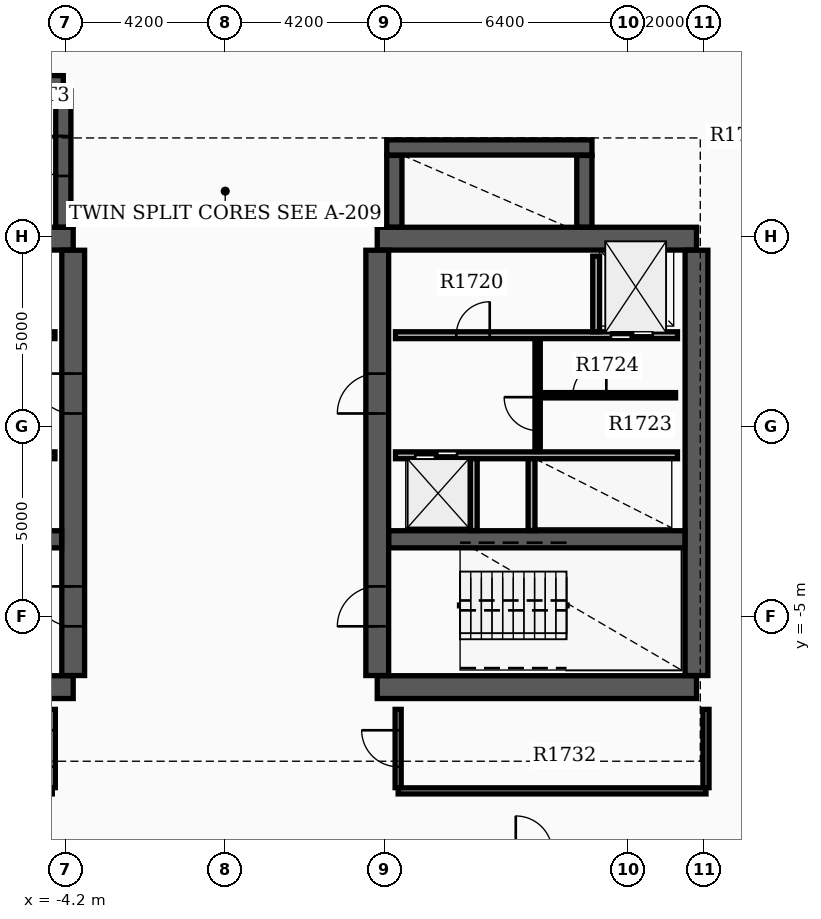
"""IFC4 building model, lengths in metres.
Left out: names, types, materials, properties, quantities, classifications, styles, units other than length and angle.
Written with IfcOpenShell. Run it as: python <this file> out.ifc"""

import sys

from ifc_helpers import new_model, si_unit, direction, frame, frame_2d, origin, place, context, subcontext, project, spatial, rectangle, extrude, element, fill, save


model = new_model("IFC4")
c1 = context("Model", 3, precision=1e-05, world=origin(), true_north=direction((0.0, 1.0)))
c2 = subcontext(c1, "Body", "Model", "MODEL_VIEW")
j1 = project(units=[si_unit("LENGTHUNIT", "METRE"), si_unit("PLANEANGLEUNIT", "RADIAN")], contexts=[c1])
p1 = place(None, origin())
s1 = spatial("IfcSite", under=j1, at=p1, CompositionType="ELEMENT")
p2 = place(p1, origin())
s2 = spatial("IfcBuilding", under=s1, at=p2, CompositionType="ELEMENT")
p3 = place(p2, frame((0.0, 0.0, 112.5)))
s3 = spatial("IfcBuildingStorey", under=s2, at=p3, CompositionType="ELEMENT", Elevation=112.5)
for number, where, z_axis, x_axis in (
    (1, (-12.4, -6.85, 0.0), (0.0, 0.0, 1.0), (1.0, 0.0, 0.0)),
    (2, (-12.4, 4.95, 0.0), (0.0, 0.0, 1.0), (1.0, 0.0, 0.0)),
):
    element("IfcWall", number, at=place(p3, frame(where, z_axis=z_axis, x_axis=x_axis)), inside=s3, PredefinedType="SHEAR", context=c2, shape_type="SweptSolid", body=[
        extrude(rectangle(XDim=8.4, YDim=0.6, at=frame_2d((4.2, 0.0))), origin(), (0.0, 0.0, 1.0), 3.7),
    ])
p4 = place(p3, frame((-4.0, -6.545, 0.0), z_axis=(0.0, 0.0, 1.0), x_axis=(0.0, 1.0, 0.0)))
e3 = element("IfcWall", 3, at=p4, inside=s3, PredefinedType="SHEAR", context=c2, shape_type="SweptSolid", body=[
    extrude(rectangle(XDim=11.19, YDim=0.6, at=frame_2d((5.595, 0.0))), origin(), (0.0, 0.0, 1.0), 3.7),
])
p5 = place(p4, frame((1.295, 0.0, 0.0)))
e4 = element("IfcOpeningElement", 4, at=p5, cuts=e3, PredefinedType="OPENING", context=c2, shape_type="SweptSolid", body=[
    extrude(rectangle(XDim=1.05, YDim=2.15, at=frame_2d((0.525, 1.075))), frame((0.0, 0.31, 0.0), z_axis=(0.0, -1.0, 0.0), x_axis=(1.0, 0.0, 0.0)), (0.0, 0.0, 1.0), 0.62),
])
p6 = place(p4, frame((6.895, 0.0, 0.0)))
e5 = element("IfcOpeningElement", 5, at=p6, cuts=e3, PredefinedType="OPENING", context=c2, shape_type="SweptSolid", body=[
    extrude(rectangle(XDim=1.05, YDim=2.15, at=frame_2d((0.525, 1.075))), frame((0.0, 0.31, 0.0), z_axis=(0.0, -1.0, 0.0), x_axis=(1.0, 0.0, 0.0)), (0.0, 0.0, 1.0), 0.62),
])
p7 = place(p3, frame((-12.095, -2.96, 0.0), z_axis=(0.0, 0.0, 1.0), x_axis=(1.0, 0.0, 0.0)))
e6 = element("IfcWall", 6, at=p7, inside=s3, PredefinedType="SHEAR", context=c2, shape_type="SweptSolid", body=[
    extrude(rectangle(XDim=7.79, YDim=0.45, at=frame_2d((3.895, 0.0))), origin(), (0.0, 0.0, 1.0), 3.7),
])
for number, where, z_axis, x_axis in (
    (7, (4.0, -6.85, 0.0), (0.0, 0.0, 1.0), (1.0, 0.0, 0.0)),
    (8, (4.0, 4.95, 0.0), (0.0, 0.0, 1.0), (1.0, 0.0, 0.0)),
):
    element("IfcWall", number, at=place(p3, frame(where, z_axis=z_axis, x_axis=x_axis)), inside=s3, PredefinedType="SHEAR", context=c2, shape_type="SweptSolid", body=[
        extrude(rectangle(XDim=8.4, YDim=0.6, at=frame_2d((4.2, 0.0))), origin(), (0.0, 0.0, 1.0), 3.7),
    ])
p8 = place(p3, frame((4.0, -6.545, 0.0), z_axis=(0.0, 0.0, 1.0), x_axis=(0.0, 1.0, 0.0)))
e9 = element("IfcWall", 9, at=p8, inside=s3, PredefinedType="SHEAR", context=c2, shape_type="SweptSolid", body=[
    extrude(rectangle(XDim=11.19, YDim=0.6, at=frame_2d((5.595, 0.0))), origin(), (0.0, 0.0, 1.0), 3.7),
])
p9 = place(p8, frame((1.295, 0.0, 0.0)))
e10 = element("IfcOpeningElement", 10, at=p9, cuts=e9, PredefinedType="OPENING", context=c2, shape_type="SweptSolid", body=[
    extrude(rectangle(XDim=1.05, YDim=2.15, at=frame_2d((0.525, 1.075))), frame((0.0, 0.31, 0.0), z_axis=(0.0, -1.0, 0.0), x_axis=(1.0, 0.0, 0.0)), (0.0, 0.0, 1.0), 0.62),
])
p10 = place(p8, frame((6.895, 0.0, 0.0)))
e11 = element("IfcOpeningElement", 11, at=p10, cuts=e9, PredefinedType="OPENING", context=c2, shape_type="SweptSolid", body=[
    extrude(rectangle(XDim=1.05, YDim=2.15, at=frame_2d((0.525, 1.075))), frame((0.0, 0.31, 0.0), z_axis=(0.0, -1.0, 0.0), x_axis=(1.0, 0.0, 0.0)), (0.0, 0.0, 1.0), 0.62),
])
p11 = place(p3, frame((12.4, -6.545, 0.0), z_axis=(0.0, 0.0, 1.0), x_axis=(0.0, 1.0, 0.0)))
e12 = element("IfcWall", 12, at=p11, inside=s3, PredefinedType="SHEAR", context=c2, shape_type="SweptSolid", body=[
    extrude(rectangle(XDim=11.19, YDim=0.6, at=frame_2d((5.595, 0.0))), origin(), (0.0, 0.0, 1.0), 3.7),
])
p12 = place(p3, frame((4.305, -2.96, 0.0), z_axis=(0.0, 0.0, 1.0), x_axis=(1.0, 0.0, 0.0)))
e13 = element("IfcWall", 13, at=p12, inside=s3, PredefinedType="SHEAR", context=c2, shape_type="SweptSolid", body=[
    extrude(rectangle(XDim=7.79, YDim=0.45, at=frame_2d((3.895, 0.0))), origin(), (0.0, 0.0, 1.0), 3.7),
])
p13 = place(p3, frame((-12.22, 9.04, 0.0), z_axis=(0.0, 0.0, 1.0), x_axis=(1.0, 0.0, 0.0)))
e14 = element("IfcWall", 14, at=p13, inside=s3, PredefinedType="SHEAR", context=c2, shape_type="SweptSolid", body=[
    extrude(rectangle(XDim=7.96, YDim=0.4, at=frame_2d((3.98, 0.0))), origin(), (0.0, 0.0, 1.0), 3.7),
])
p14 = place(p3, frame((-4.26, 5.255, 0.0), z_axis=(0.0, 0.0, 1.0), x_axis=(0.0, 1.0, 0.0)))
e15 = element("IfcWall", 15, at=p14, inside=s3, PredefinedType="SHEAR", context=c2, shape_type="SweptSolid", body=[
    extrude(rectangle(XDim=3.58, YDim=0.4, at=frame_2d((1.79, 0.0))), origin(), (0.0, 0.0, 1.0), 3.7),
])
p15 = place(p14, frame((1.345, 0.0, 0.0)))
e16 = element("IfcOpeningElement", 16, at=p15, cuts=e15, PredefinedType="OPENING", context=c2, shape_type="SweptSolid", body=[
    extrude(rectangle(XDim=1.05, YDim=2.15, at=frame_2d((0.525, 1.075))), frame((0.0, 0.21, 0.0), z_axis=(0.0, -1.0, 0.0), x_axis=(1.0, 0.0, 0.0)), (0.0, 0.0, 1.0), 0.42),
])
p16 = place(p3, frame((4.45, 5.255, 0.0), z_axis=(0.0, 0.0, 1.0), x_axis=(0.0, 1.0, 0.0)))
e17 = element("IfcWall", 17, at=p16, inside=s3, PredefinedType="SHEAR", context=c2, shape_type="SweptSolid", body=[
    extrude(rectangle(XDim=1.885, YDim=0.4, at=frame_2d((0.942, 0.0))), origin(), (0.0, 0.0, 1.0), 3.7),
])
p17 = place(p3, frame((4.25, 7.35, 0.0), z_axis=(0.0, 0.0, 1.0), x_axis=(1.0, 0.0, 0.0)))
e18 = element("IfcWall", 18, at=p17, inside=s3, PredefinedType="SHEAR", context=c2, shape_type="SweptSolid", body=[
    extrude(rectangle(XDim=5.4, YDim=0.4, at=frame_2d((2.7, 0.0))), origin(), (0.0, 0.0, 1.0), 3.7),
])
p18 = place(p3, frame((9.45, 5.255, 0.0), z_axis=(0.0, 0.0, 1.0), x_axis=(0.0, 1.0, 0.0)))
e19 = element("IfcWall", 19, at=p18, inside=s3, PredefinedType="SHEAR", context=c2, shape_type="SweptSolid", body=[
    extrude(rectangle(XDim=1.885, YDim=0.4, at=frame_2d((0.942, 0.0))), origin(), (0.0, 0.0, 1.0), 3.7),
])
p19 = place(p3, frame((-11.9, 2.41, 0.0), z_axis=(0.0, 0.0, 1.0), x_axis=(1.0, 0.0, 0.0)))
e20 = element("IfcWall", 20, at=p19, inside=s3, PredefinedType="SOLIDWALL", context=c2, shape_type="SweptSolid", body=[
    extrude(rectangle(XDim=7.42, YDim=0.18, at=frame_2d((3.71, 0.0))), origin(), (0.0, 0.0, 1.0), 2.96),
])
p20 = place(p19, frame((0.55, 0.0, 0.0)))
e21 = element("IfcOpeningElement", 21, at=p20, cuts=e20, PredefinedType="OPENING", context=c2, shape_type="SweptSolid", body=[
    extrude(rectangle(XDim=1.1, YDim=2.15, at=frame_2d((0.55, 1.075))), frame((0.0, 0.1, 0.0), z_axis=(0.0, -1.0, 0.0), x_axis=(1.0, 0.0, 0.0)), (0.0, 0.0, 1.0), 0.2),
])
p21 = place(p19, frame((4.9, 0.0, 0.0)))
e22 = element("IfcOpeningElement", 22, at=p21, cuts=e20, PredefinedType="OPENING", context=c2, shape_type="SweptSolid", body=[
    extrude(rectangle(XDim=0.88, YDim=2.1, at=frame_2d((0.44, 1.05))), frame((0.0, 0.1, 0.0), z_axis=(0.0, -1.0, 0.0), x_axis=(1.0, 0.0, 0.0)), (0.0, 0.0, 1.0), 0.2),
])
p22 = place(p3, frame((4.48, 2.41, 0.0), z_axis=(0.0, 0.0, 1.0), x_axis=(1.0, 0.0, 0.0)))
e23 = element("IfcWall", 23, at=p22, inside=s3, PredefinedType="SOLIDWALL", context=c2, shape_type="SweptSolid", body=[
    extrude(rectangle(XDim=7.42, YDim=0.18, at=frame_2d((3.71, 0.0))), origin(), (0.0, 0.0, 1.0), 2.96),
])
p23 = place(p22, frame((5.67, 0.0, 0.0)))
e24 = element("IfcOpeningElement", 24, at=p23, cuts=e23, PredefinedType="OPENING", context=c2, shape_type="SweptSolid", body=[
    extrude(rectangle(XDim=1.1, YDim=2.15, at=frame_2d((0.55, 1.075))), frame((0.0, 0.1, 0.0), z_axis=(0.0, -1.0, 0.0), x_axis=(1.0, 0.0, 0.0)), (0.0, 0.0, 1.0), 0.2),
])
p24 = place(p22, frame((1.6, 0.0, 0.0)))
e25 = element("IfcOpeningElement", 25, at=p24, cuts=e23, PredefinedType="OPENING", context=c2, shape_type="SweptSolid", body=[
    extrude(rectangle(XDim=0.88, YDim=2.1, at=frame_2d((0.44, 1.05))), frame((0.0, 0.1, 0.0), z_axis=(0.0, -1.0, 0.0), x_axis=(1.0, 0.0, 0.0)), (0.0, 0.0, 1.0), 0.2),
])
p25 = place(p3, frame((-11.9, -0.75, 0.0), z_axis=(0.0, 0.0, 1.0), x_axis=(1.0, 0.0, 0.0)))
e26 = element("IfcWall", 26, at=p25, inside=s3, PredefinedType="SOLIDWALL", context=c2, shape_type="SweptSolid", body=[
    extrude(rectangle(XDim=7.42, YDim=0.18, at=frame_2d((3.71, 0.0))), origin(), (0.0, 0.0, 1.0), 2.96),
])
p26 = place(p25, frame((0.45, 0.0, 0.0)))
e27 = element("IfcOpeningElement", 27, at=p26, cuts=e26, PredefinedType="OPENING", context=c2, shape_type="SweptSolid", body=[
    extrude(rectangle(XDim=1.1, YDim=2.15, at=frame_2d((0.55, 1.075))), frame((0.0, 0.1, 0.0), z_axis=(0.0, -1.0, 0.0), x_axis=(1.0, 0.0, 0.0)), (0.0, 0.0, 1.0), 0.2),
])
p27 = place(p25, frame((2.35, 0.0, 0.0)))
e28 = element("IfcOpeningElement", 28, at=p27, cuts=e26, PredefinedType="OPENING", context=c2, shape_type="SweptSolid", body=[
    extrude(rectangle(XDim=1.1, YDim=2.15, at=frame_2d((0.55, 1.075))), frame((0.0, 0.1, 0.0), z_axis=(0.0, -1.0, 0.0), x_axis=(1.0, 0.0, 0.0)), (0.0, 0.0, 1.0), 0.2),
])
p28 = place(p3, frame((4.48, -0.75, 0.0), z_axis=(0.0, 0.0, 1.0), x_axis=(1.0, 0.0, 0.0)))
e29 = element("IfcWall", 29, at=p28, inside=s3, PredefinedType="SOLIDWALL", context=c2, shape_type="SweptSolid", body=[
    extrude(rectangle(XDim=7.42, YDim=0.18, at=frame_2d((3.71, 0.0))), origin(), (0.0, 0.0, 1.0), 2.96),
])
p29 = place(p28, frame((0.52, 0.0, 0.0)))
e30 = element("IfcOpeningElement", 30, at=p29, cuts=e29, PredefinedType="OPENING", context=c2, shape_type="SweptSolid", body=[
    extrude(rectangle(XDim=1.1, YDim=2.15, at=frame_2d((0.55, 1.075))), frame((0.0, 0.1, 0.0), z_axis=(0.0, -1.0, 0.0), x_axis=(1.0, 0.0, 0.0)), (0.0, 0.0, 1.0), 0.2),
])
p30 = place(p3, frame((9.76, 2.5, 0.0), z_axis=(0.0, 0.0, 1.0), x_axis=(0.0, 1.0, 0.0)))
e31 = element("IfcWall", 31, at=p30, inside=s3, PredefinedType="SOLIDWALL", context=c2, shape_type="SweptSolid", body=[
    extrude(rectangle(XDim=1.99, YDim=0.18, at=frame_2d((0.995, 0.0))), origin(), (0.0, 0.0, 1.0), 2.96),
])
for number, where, z_axis, x_axis in (
    (32, (6.54, -2.73, 0.0), (0.0, 0.0, 1.0), (0.0, 1.0, 0.0)),
    (33, (8.06, -2.73, 0.0), (0.0, 0.0, 1.0), (0.0, 1.0, 0.0)),
):
    element("IfcWall", number, at=place(p3, frame(where, z_axis=z_axis, x_axis=x_axis)), inside=s3, PredefinedType="SOLIDWALL", context=c2, shape_type="SweptSolid", body=[
        extrude(rectangle(XDim=1.89, YDim=0.18, at=frame_2d((0.945, 0.0))), origin(), (0.0, 0.0, 1.0), 2.96),
    ])
p31 = place(p3, frame((8.22, -0.65, 0.0), z_axis=(0.0, 0.0, 1.0), x_axis=(0.0, 1.0, 0.0)))
e34 = element("IfcWall", 34, at=p31, inside=s3, PredefinedType="SOLIDWALL", context=c2, shape_type="SweptSolid", body=[
    extrude(rectangle(XDim=2.96, YDim=0.14, at=frame_2d((1.48, 0.0))), origin(), (0.0, 0.0, 1.0), 2.96),
])
p32 = place(p31, frame((0.55, 0.0, 0.0)))
e35 = element("IfcOpeningElement", 35, at=p32, cuts=e34, PredefinedType="OPENING", context=c2, shape_type="SweptSolid", body=[
    extrude(rectangle(XDim=0.88, YDim=2.1, at=frame_2d((0.44, 1.05))), frame((0.0, 0.08, 0.0), z_axis=(0.0, -1.0, 0.0), x_axis=(1.0, 0.0, 0.0)), (0.0, 0.0, 1.0), 0.16),
])
p33 = place(p3, frame((8.298, 0.83, 0.0), z_axis=(0.0, 0.0, 1.0), x_axis=(1.0, 0.0, 0.0)))
e36 = element("IfcWall", 36, at=p33, inside=s3, PredefinedType="PARTITIONING", context=c2, shape_type="SweptSolid", body=[
    extrude(rectangle(XDim=3.552, YDim=0.14, at=frame_2d((1.776, 0.0))), origin(), (0.0, 0.0, 1.0), 2.96),
])
p34 = place(p33, frame((0.85, 0.0, 0.0)))
e37 = element("IfcOpeningElement", 37, at=p34, cuts=e36, PredefinedType="OPENING", context=c2, shape_type="SweptSolid", body=[
    extrude(rectangle(XDim=0.88, YDim=2.1, at=frame_2d((0.44, 1.05))), frame((0.0, 0.08, 0.0), z_axis=(0.0, -1.0, 0.0), x_axis=(1.0, 0.0, 0.0)), (0.0, 0.0, 1.0), 0.16),
])
p35 = place(p3, frame((4.55, -9.58, 0.0), z_axis=(0.0, 0.0, 1.0), x_axis=(1.0, 0.0, 0.0)))
e38 = element("IfcWall", 38, at=p35, inside=s3, PredefinedType="PARTITIONING", context=c2, shape_type="SweptSolid", body=[
    extrude(rectangle(XDim=8.1, YDim=0.16, at=frame_2d((4.05, 0.0))), origin(), (0.0, 0.0, 1.0), 2.96),
])
p36 = place(p3, frame((4.55, -9.495, 0.0), z_axis=(0.0, 0.0, 1.0), x_axis=(0.0, 1.0, 0.0)))
e39 = element("IfcWall", 39, at=p36, inside=s3, PredefinedType="PARTITIONING", context=c2, shape_type="SweptSolid", body=[
    extrude(rectangle(XDim=2.06, YDim=0.16, at=frame_2d((1.03, 0.0))), origin(), (0.0, 0.0, 1.0), 2.96),
])
p37 = place(p36, frame((0.55, 0.0, 0.0)))
e40 = element("IfcOpeningElement", 40, at=p37, cuts=e39, PredefinedType="OPENING", context=c2, shape_type="SweptSolid", body=[
    extrude(rectangle(XDim=0.96, YDim=2.15, at=frame_2d((0.48, 1.075))), frame((0.0, 0.09, 0.0), z_axis=(0.0, -1.0, 0.0), x_axis=(1.0, 0.0, 0.0)), (0.0, 0.0, 1.0), 0.18),
])
p38 = place(p3, frame((12.65, -9.495, 0.0), z_axis=(0.0, 0.0, 1.0), x_axis=(0.0, 1.0, 0.0)))
e41 = element("IfcWall", 41, at=p38, inside=s3, PredefinedType="PARTITIONING", context=c2, shape_type="SweptSolid", body=[
    extrude(rectangle(XDim=2.06, YDim=0.16, at=frame_2d((1.03, 0.0))), origin(), (0.0, 0.0, 1.0), 2.96),
])
p39 = place(p3, frame((-4.55, -9.495, 0.0), z_axis=(0.0, 0.0, 1.0), x_axis=(0.0, 1.0, 0.0)))
e42 = element("IfcWall", 42, at=p39, inside=s3, PredefinedType="PARTITIONING", context=c2, shape_type="SweptSolid", body=[
    extrude(rectangle(XDim=2.06, YDim=0.16, at=frame_2d((1.03, 0.0))), origin(), (0.0, 0.0, 1.0), 2.96),
])
p40 = place(p39, frame((0.55, 0.0, 0.0)))
e43 = element("IfcOpeningElement", 43, at=p40, cuts=e42, PredefinedType="OPENING", context=c2, shape_type="SweptSolid", body=[
    extrude(rectangle(XDim=0.96, YDim=2.15, at=frame_2d((0.48, 1.075))), frame((0.0, 0.09, 0.0), z_axis=(0.0, -1.0, 0.0), x_axis=(1.0, 0.0, 0.0)), (0.0, 0.0, 1.0), 0.18),
])
p41 = place(p5, origin())
e44 = element("IfcDoor", 44, at=p41, inside=s3, OperationType="SINGLE_SWING_RIGHT", PredefinedType="DOOR", context=c2, shape_type="SweptSolid", body=[
    extrude(rectangle(XDim=1.05, YDim=2.15, at=frame_2d((0.525, 1.075))), frame((0.0, 0.025, 0.0), z_axis=(0.0, -1.0, 0.0), x_axis=(1.0, 0.0, 0.0)), (0.0, 0.0, 1.0), 0.05),
])
fill(e4, e44)
p42 = place(p9, origin())
e45 = element("IfcDoor", 45, at=p42, inside=s3, OperationType="SINGLE_SWING_LEFT", PredefinedType="DOOR", context=c2, shape_type="SweptSolid", body=[
    extrude(rectangle(XDim=1.05, YDim=2.15, at=frame_2d((0.525, 1.075))), frame((0.0, 0.025, 0.0), z_axis=(0.0, -1.0, 0.0), x_axis=(1.0, 0.0, 0.0)), (0.0, 0.0, 1.0), 0.05),
])
fill(e10, e45)
p43 = place(p6, origin())
e46 = element("IfcDoor", 46, at=p43, inside=s3, OperationType="SINGLE_SWING_RIGHT", PredefinedType="DOOR", context=c2, shape_type="SweptSolid", body=[
    extrude(rectangle(XDim=1.05, YDim=2.15, at=frame_2d((0.525, 1.075))), frame((0.0, 0.025, 0.0), z_axis=(0.0, -1.0, 0.0), x_axis=(1.0, 0.0, 0.0)), (0.0, 0.0, 1.0), 0.05),
])
fill(e5, e46)
p44 = place(p10, origin())
e47 = element("IfcDoor", 47, at=p44, inside=s3, OperationType="SINGLE_SWING_LEFT", PredefinedType="DOOR", context=c2, shape_type="SweptSolid", body=[
    extrude(rectangle(XDim=1.05, YDim=2.15, at=frame_2d((0.525, 1.075))), frame((0.0, 0.025, 0.0), z_axis=(0.0, -1.0, 0.0), x_axis=(1.0, 0.0, 0.0)), (0.0, 0.0, 1.0), 0.05),
])
fill(e11, e47)
p45 = place(p15, origin())
e48 = element("IfcDoor", 48, at=p45, inside=s3, OperationType="SINGLE_SWING_RIGHT", PredefinedType="DOOR", context=c2, shape_type="SweptSolid", body=[
    extrude(rectangle(XDim=1.05, YDim=2.15, at=frame_2d((0.525, 1.075))), frame((0.0, 0.025, 0.0), z_axis=(0.0, -1.0, 0.0), x_axis=(1.0, 0.0, 0.0)), (0.0, 0.0, 1.0), 0.05),
])
fill(e16, e48)
p46 = place(p23, origin())
e49 = element("IfcDoor", 49, at=p46, inside=s3, OperationType="DOUBLE_DOOR_SLIDING", PredefinedType="DOOR", context=c2, shape_type="SweptSolid", body=[
    extrude(rectangle(XDim=1.1, YDim=2.15, at=frame_2d((0.55, 1.075))), frame((0.0, 0.025, 0.0), z_axis=(0.0, -1.0, 0.0), x_axis=(1.0, 0.0, 0.0)), (0.0, 0.0, 1.0), 0.05),
])
fill(e24, e49)
p47 = place(p29, origin())
e50 = element("IfcDoor", 50, at=p47, inside=s3, OperationType="DOUBLE_DOOR_SLIDING", PredefinedType="DOOR", context=c2, shape_type="SweptSolid", body=[
    extrude(rectangle(XDim=1.1, YDim=2.15, at=frame_2d((0.55, 1.075))), frame((0.0, 0.025, 0.0), z_axis=(0.0, -1.0, 0.0), x_axis=(1.0, 0.0, 0.0)), (0.0, 0.0, 1.0), 0.05),
])
fill(e30, e50)
p48 = place(p24, origin())
e51 = element("IfcDoor", 51, at=p48, inside=s3, OperationType="SINGLE_SWING_RIGHT", PredefinedType="DOOR", context=c2, shape_type="SweptSolid", body=[
    extrude(rectangle(XDim=0.88, YDim=2.1, at=frame_2d((0.44, 1.05))), frame((0.0, 0.025, 0.0), z_axis=(0.0, -1.0, 0.0), x_axis=(1.0, 0.0, 0.0)), (0.0, 0.0, 1.0), 0.05),
])
fill(e25, e51)
p49 = place(p32, origin())
e52 = element("IfcDoor", 52, at=p49, inside=s3, OperationType="SINGLE_SWING_RIGHT", PredefinedType="DOOR", context=c2, shape_type="SweptSolid", body=[
    extrude(rectangle(XDim=0.88, YDim=2.1, at=frame_2d((0.44, 1.05))), frame((0.0, 0.025, 0.0), z_axis=(0.0, -1.0, 0.0), x_axis=(1.0, 0.0, 0.0)), (0.0, 0.0, 1.0), 0.05),
])
fill(e35, e52)
p50 = place(p34, origin())
e53 = element("IfcDoor", 53, at=p50, inside=s3, OperationType="SINGLE_SWING_RIGHT", PredefinedType="DOOR", context=c2, shape_type="SweptSolid", body=[
    extrude(rectangle(XDim=0.88, YDim=2.1, at=frame_2d((0.44, 1.05))), frame((0.0, 0.025, 0.0), z_axis=(0.0, -1.0, 0.0), x_axis=(1.0, 0.0, 0.0)), (0.0, 0.0, 1.0), 0.05),
])
fill(e37, e53)
p51 = place(p37, origin())
e54 = element("IfcDoor", 54, at=p51, inside=s3, OperationType="SINGLE_SWING_RIGHT", PredefinedType="DOOR", context=c2, shape_type="SweptSolid", body=[
    extrude(rectangle(XDim=0.96, YDim=2.15, at=frame_2d((0.48, 1.075))), frame((0.0, 0.025, 0.0), z_axis=(0.0, -1.0, 0.0), x_axis=(1.0, 0.0, 0.0)), (0.0, 0.0, 1.0), 0.05),
])
fill(e40, e54)
p52 = place(p40, origin())
e55 = element("IfcDoor", 55, at=p52, inside=s3, OperationType="SINGLE_SWING_LEFT", PredefinedType="DOOR", context=c2, shape_type="SweptSolid", body=[
    extrude(rectangle(XDim=0.96, YDim=2.15, at=frame_2d((0.48, 1.075))), frame((0.0, 0.025, 0.0), z_axis=(0.0, -1.0, 0.0), x_axis=(1.0, 0.0, 0.0)), (0.0, 0.0, 1.0), 0.05),
])
fill(e43, e55)
save(model, sys.argv[1])
